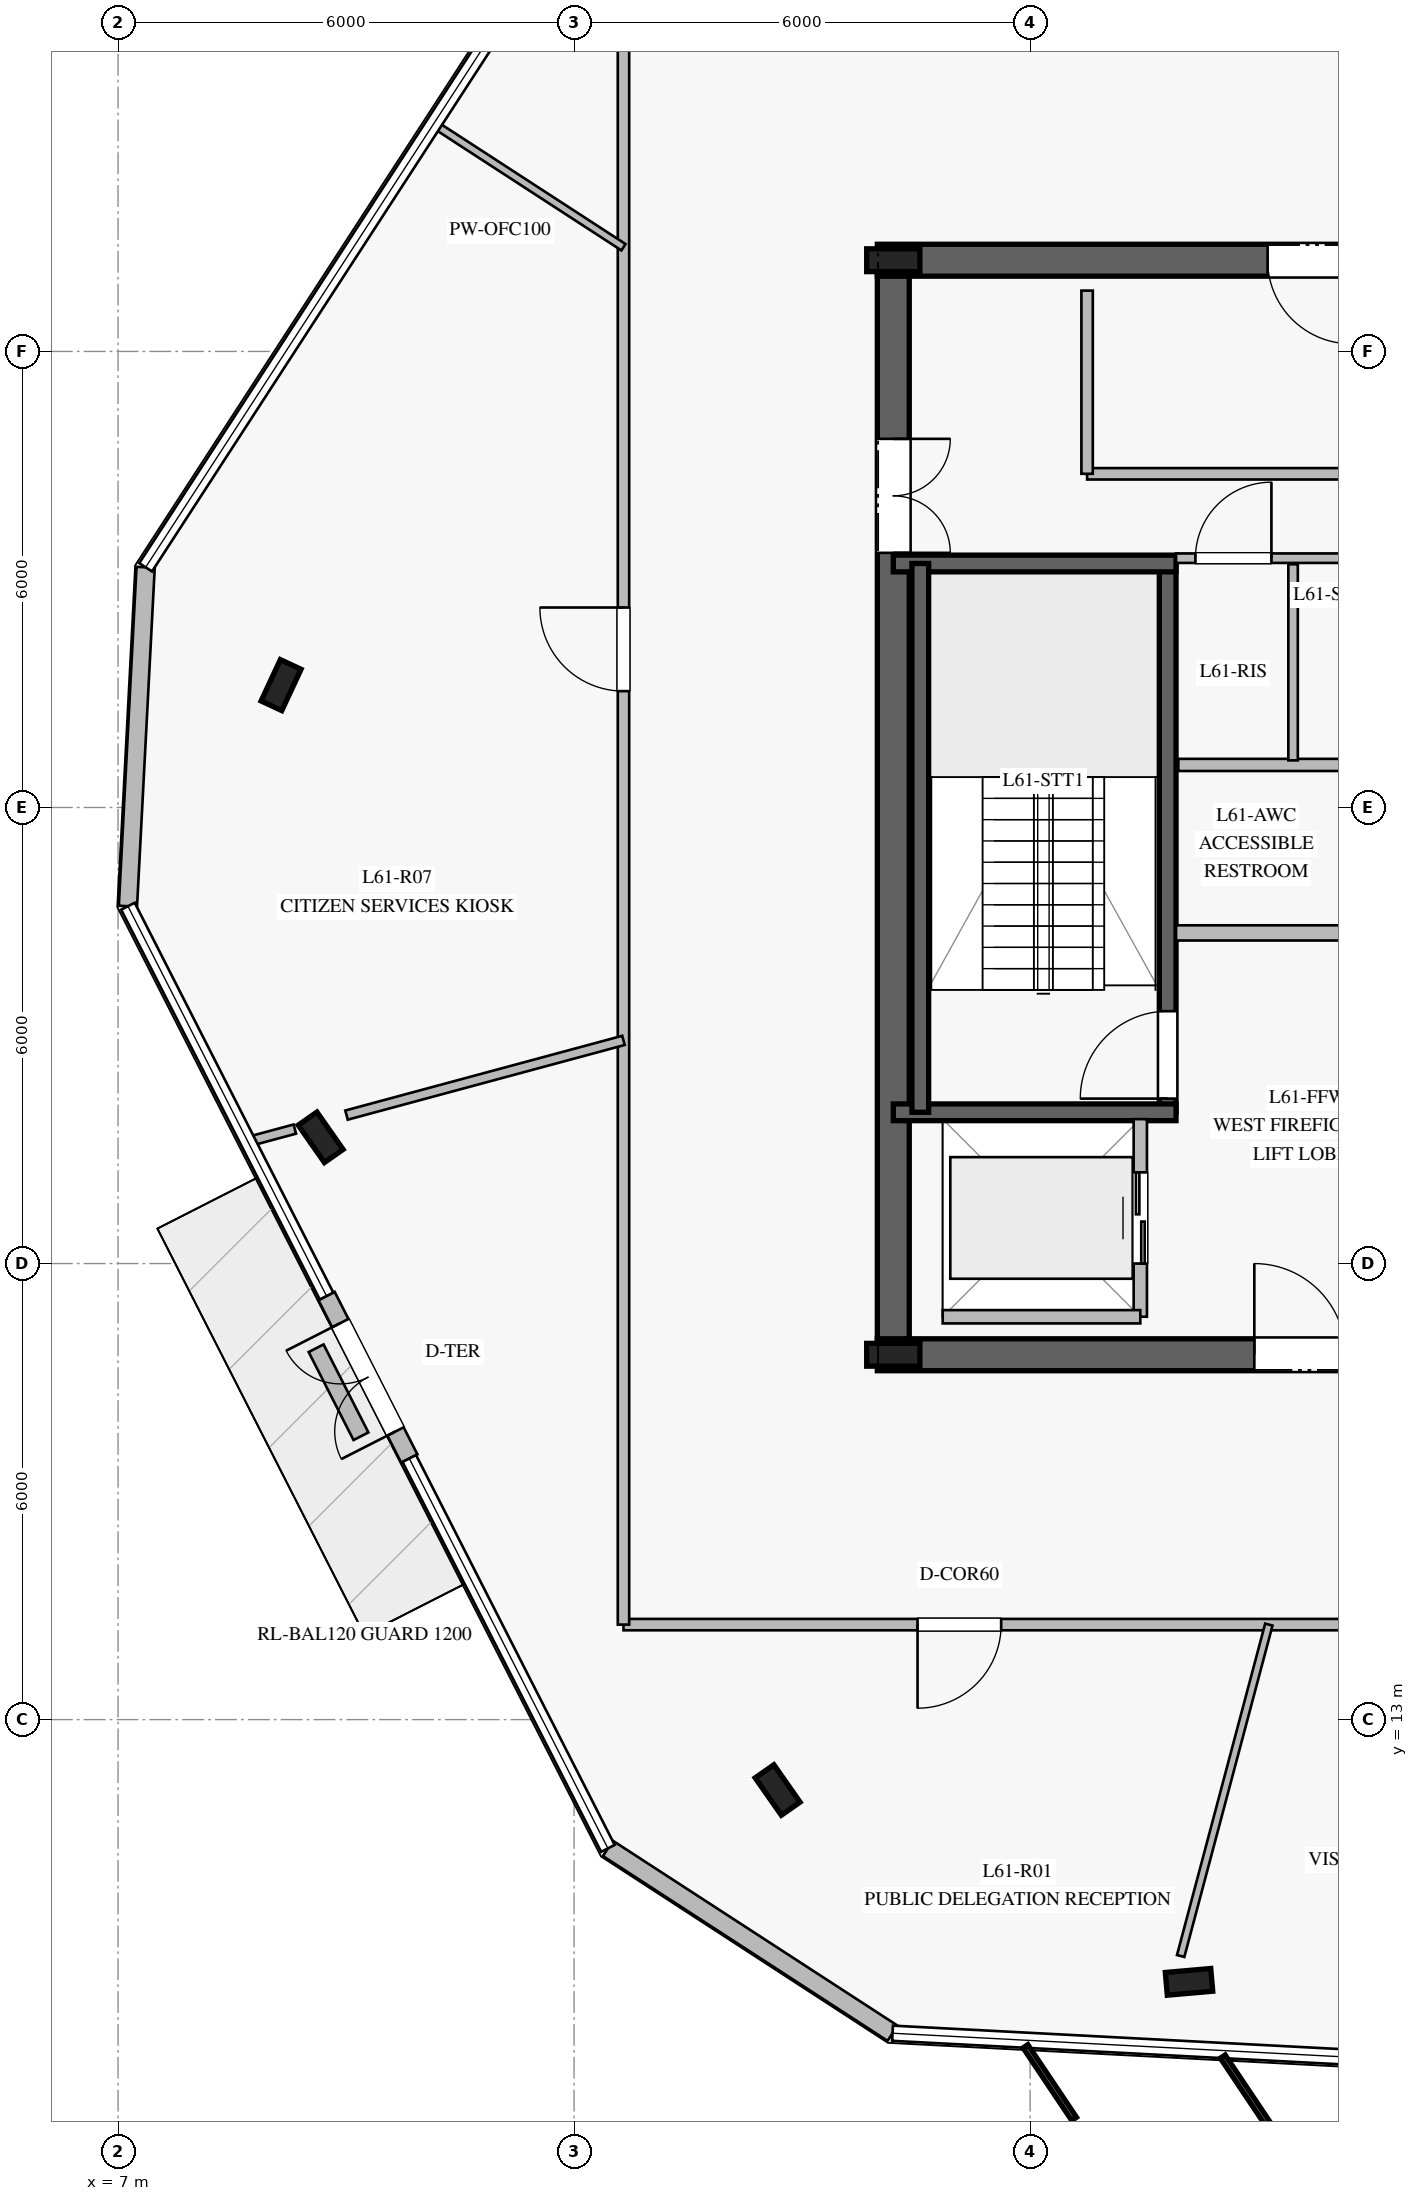
"""IFC4 building model, lengths in metres.
Left out: names, types, materials, properties, quantities, classifications, styles, units other than length and angle.
Written with IfcOpenShell. Run it as: python <this file> out.ifc"""

import sys

from ifc_helpers import new_model, si_unit, direction, frame, frame_2d, origin, origin_2d, place, context, subcontext, project, spatial, rectangle, i_section, extrude, element, fill, save


model = new_model("IFC4")
c1 = context("Model", 3, precision=1e-05, world=origin(), true_north=direction((0.0, 1.0)))
c2 = subcontext(c1, "Body", "Model", "MODEL_VIEW")
j1 = project(units=[si_unit("LENGTHUNIT", "METRE"), si_unit("PLANEANGLEUNIT", "RADIAN")], contexts=[c1])
p1 = place(None, origin())
s1 = spatial("IfcSite", under=j1, at=p1, CompositionType="ELEMENT")
p2 = place(p1, origin())
s2 = spatial("IfcBuilding", under=s1, at=p2, CompositionType="ELEMENT")
p3 = place(p2, frame((0.0, 0.0, 254.2)))
s3 = spatial("IfcBuildingStorey", under=s2, at=p3, CompositionType="ELEMENT", Elevation=254.2)
p4 = place(p3, frame((16.99, 17.8, 0.0), z_axis=(0.0, 0.0, 1.0), x_axis=(1.0, 0.0, 0.0)))
e1 = element("IfcWall", 1, at=p4, inside=s3, PredefinedType="SHEAR", context=c2, shape_type="SweptSolid", body=[
    extrude(rectangle(XDim=16.02, YDim=0.42, at=frame_2d((8.01, 0.0))), origin(), (0.0, 0.0, 1.0), 3.78),
])
p5 = place(p4, frame((4.96, 0.0, 0.0)))
e2 = element("IfcOpeningElement", 2, at=p5, cuts=e1, PredefinedType="OPENING", context=c2, shape_type="SweptSolid", body=[
    extrude(rectangle(XDim=1.2, YDim=2.25, at=frame_2d((0.6, 1.125))), frame((0.0, 0.22, 0.0), z_axis=(0.0, -1.0, 0.0), x_axis=(1.0, 0.0, 0.0)), (0.0, 0.0, 1.0), 0.44),
])
p6 = place(p4, frame((10.86, 0.0, 0.0)))
e3 = element("IfcOpeningElement", 3, at=p6, cuts=e1, PredefinedType="OPENING", context=c2, shape_type="SweptSolid", body=[
    extrude(rectangle(XDim=1.1, YDim=2.2, at=frame_2d((0.55, 1.1))), frame((0.0, 0.22, 0.0), z_axis=(0.0, -1.0, 0.0), x_axis=(1.0, 0.0, 0.0)), (0.0, 0.0, 1.0), 0.44),
])
p7 = place(p3, frame((33.01, 32.2, 0.0), z_axis=(0.0, 0.0, 1.0), x_axis=(-1.0, 0.0, 0.0)))
e4 = element("IfcWall", 4, at=p7, inside=s3, PredefinedType="SHEAR", context=c2, shape_type="SweptSolid", body=[
    extrude(rectangle(XDim=16.02, YDim=0.42, at=frame_2d((8.01, 0.0))), origin(), (0.0, 0.0, 1.0), 3.78),
])
p8 = place(p7, frame((4.96, 0.0, 0.0)))
e5 = element("IfcOpeningElement", 5, at=p8, cuts=e4, PredefinedType="OPENING", context=c2, shape_type="SweptSolid", body=[
    extrude(rectangle(XDim=1.2, YDim=2.25, at=frame_2d((0.6, 1.125))), frame((0.0, 0.22, 0.0), z_axis=(0.0, -1.0, 0.0), x_axis=(1.0, 0.0, 0.0)), (0.0, 0.0, 1.0), 0.44),
])
p9 = place(p7, frame((9.785, 0.0, 0.0)))
e6 = element("IfcOpeningElement", 6, at=p9, cuts=e4, PredefinedType="OPENING", context=c2, shape_type="SweptSolid", body=[
    extrude(rectangle(XDim=1.1, YDim=2.2, at=frame_2d((0.55, 1.1))), frame((0.0, 0.22, 0.0), z_axis=(0.0, -1.0, 0.0), x_axis=(1.0, 0.0, 0.0)), (0.0, 0.0, 1.0), 0.44),
])
p10 = place(p3, frame((17.2, 31.99, 0.0), z_axis=(0.0, 0.0, 1.0), x_axis=(0.0, -1.0, 0.0)))
e7 = element("IfcWall", 7, at=p10, inside=s3, PredefinedType="SHEAR", context=c2, shape_type="SweptSolid", body=[
    extrude(rectangle(XDim=13.98, YDim=0.42, at=frame_2d((6.99, 0.0))), origin(), (0.0, 0.0, 1.0), 3.78),
])
p11 = place(p10, frame((2.14, 0.0, 0.0)))
e8 = element("IfcOpeningElement", 8, at=p11, cuts=e7, PredefinedType="OPENING", context=c2, shape_type="SweptSolid", body=[
    extrude(rectangle(XDim=1.5, YDim=2.2, at=frame_2d((0.75, 1.1))), frame((0.0, 0.22, 0.0), z_axis=(0.0, -1.0, 0.0), x_axis=(1.0, 0.0, 0.0)), (0.0, 0.0, 1.0), 0.44),
])
for number, where, z_axis, x_axis in (
    (9, (17.2, 17.8, 0.0), (0.0, 0.0, 1.0), (1.0, 0.0, 0.0)),
    (10, (17.2, 32.2, 0.0), (0.0, 0.0, 1.0), (1.0, 0.0, 0.0)),
):
    element("IfcColumn", number, at=place(p3, frame(where, z_axis=z_axis, x_axis=x_axis)), inside=s3, PredefinedType="COLUMN", context=c2, shape_type="SweptSolid", body=[
        extrude(i_section(OverallWidth=0.3, OverallDepth=0.7, WebThickness=0.017, FlangeThickness=0.032, at=origin_2d()), origin(), (0.0, 0.0, 1.0), 4.0),
    ])
p12 = place(p3, frame((20.81, 20.99, 0.0), z_axis=(0.0, 0.0, 1.0), x_axis=(0.0, 1.0, 0.0)))
e11 = element("IfcWall", 11, at=p12, inside=s3, PredefinedType="SOLIDWALL", context=c2, shape_type="SweptSolid", body=[
    extrude(rectangle(XDim=7.22, YDim=0.22, at=frame_2d((3.61, 0.0))), origin(), (0.0, 0.0, 1.0), 3.78),
])
p13 = place(p12, frame((0.18, 0.0, 0.0)))
e12 = element("IfcOpeningElement", 12, at=p13, cuts=e11, PredefinedType="OPENING", context=c2, shape_type="SweptSolid", body=[
    extrude(rectangle(XDim=1.15, YDim=2.2, at=frame_2d((0.575, 1.1))), frame((0.0, 0.12, 0.0), z_axis=(0.0, -1.0, 0.0), x_axis=(1.0, 0.0, 0.0)), (0.0, 0.0, 1.0), 0.24),
])
for number, where, z_axis, x_axis in (
    (13, (17.2, 20.99, 0.0), (0.0, 0.0, 1.0), (1.0, 0.0, 0.0)),
    (14, (17.2, 28.21, 0.0), (0.0, 0.0, 1.0), (1.0, 0.0, 0.0)),
):
    element("IfcWall", number, at=place(p3, frame(where, z_axis=z_axis, x_axis=x_axis)), inside=s3, PredefinedType="SOLIDWALL", context=c2, shape_type="SweptSolid", body=[
        extrude(rectangle(XDim=3.72, YDim=0.22, at=frame_2d((1.86, 0.0))), origin(), (0.0, 0.0, 1.0), 3.78),
    ])
p14 = place(p3, frame((17.555, 28.21, 0.0), z_axis=(0.0, 0.0, 1.0), x_axis=(0.0, -1.0, 0.0)))
e15 = element("IfcWall", 15, at=p14, inside=s3, PredefinedType="SOLIDWALL", context=c2, shape_type="SweptSolid", body=[
    extrude(rectangle(XDim=7.22, YDim=0.22, at=frame_2d((3.61, 0.0))), origin(), (0.0, 0.0, 1.0), 3.78),
])
for number, where, z_axis, x_axis in (
    (16, (9.145, 26.61, 0.0), (0.0, 0.0, 1.0), (0.423, 0.906, 0.0)),
    (17, (9.666, 20.661, 0.0), (0.0, 0.0, 1.0), (-0.574, 0.819, 0.0)),
    (18, (15.678, 12.074, 0.0), (0.0, 0.0, 1.0), (-0.574, 0.819, 0.0)),
    (19, (21.091, 9.55, 0.0), (0.0, 0.0, 1.0), (0.996, 0.087, 0.0)),
):
    element("IfcColumn", number, at=place(p3, frame(where, z_axis=z_axis, x_axis=x_axis)), inside=s3, PredefinedType="COLUMN", context=c2, shape_type="SweptSolid", body=[
        extrude(i_section(OverallWidth=0.3, OverallDepth=0.6, WebThickness=0.015, FlangeThickness=0.03, at=origin_2d()), origin(), (0.0, 0.0, 1.0), 4.0),
    ])
p15 = place(p3, frame((7.363, 28.16, 0.0), z_axis=(0.0, 0.0, 1.0), x_axis=(-0.052217320226, -0.998635745139, 0.0)))
e20 = element("IfcWall", 20, at=p15, inside=s3, PredefinedType="STANDARD", context=c2, shape_type="SweptSolid", body=[
    extrude(rectangle(XDim=4.465, YDim=0.24, at=frame_2d((2.232, 0.0))), origin(), (0.0, 0.0, 1.0), 3.78),
])
p16 = place(p3, frame((9.743, 18.573, 0.0), z_axis=(0.0, 0.0, 1.0), x_axis=(0.453916635775, -0.891044155902, 0.0)))
e21 = element("IfcWall", 21, at=p16, inside=s3, PredefinedType="STANDARD", context=c2, shape_type="SweptSolid", body=[
    extrude(rectangle(XDim=2.399, YDim=0.24, at=frame_2d((1.2, 0.0))), origin(), (0.0, 0.0, 1.0), 3.78),
])
p17 = place(p16, frame((0.4, 0.0, 0.0)))
e22 = element("IfcOpeningElement", 22, at=p17, cuts=e21, PredefinedType="OPENING", context=c2, shape_type="SweptSolid", body=[
    extrude(rectangle(XDim=1.6, YDim=2.25, at=frame_2d((0.8, 1.125))), frame((0.0, 0.13, 0.0), z_axis=(0.0, -1.0, 0.0), x_axis=(1.0, 0.0, 0.0)), (0.0, 0.0, 1.0), 0.26),
])
p18 = place(p3, frame((13.445, 11.306, 0.0), z_axis=(0.0, 0.0, 1.0), x_axis=(0.838677137994, -0.544628917893, 0.0)))
e23 = element("IfcWall", 23, at=p18, inside=s3, PredefinedType="STANDARD", context=c2, shape_type="SweptSolid", body=[
    extrude(rectangle(XDim=4.465, YDim=0.24, at=frame_2d((2.233, 0.0))), origin(), (0.0, 0.0, 1.0), 3.78),
])
p19 = place(p3, frame((9.606, 17.886, 0.0), z_axis=(0.0, 0.0, 1.0), x_axis=(0.454038340343, -0.890982146565, 0.0)))
e24 = element("IfcWall", 24, at=p19, inside=s3, PredefinedType="USERDEFINED", context=c2, shape_type="SweptSolid", body=[
    extrude(rectangle(XDim=1.3, YDim=0.22, at=frame_2d((0.65, 0.0))), origin(), (0.0, 0.0, 1.0), 0.4),
])
p20 = place(p3, frame((20.92, 23.35, 0.0), z_axis=(0.0, 0.0, 1.0), x_axis=(1.0, 0.0, 0.0)))
e25 = element("IfcWall", 25, at=p20, inside=s3, PredefinedType="PARTITIONING", context=c2, shape_type="SweptSolid", body=[
    extrude(rectangle(XDim=3.38, YDim=0.2, at=frame_2d((1.69, 0.0))), origin(), (0.0, 0.0, 1.0), 3.78),
])
p21 = place(p3, frame((20.92, 28.28, 0.0), z_axis=(0.0, 0.0, 1.0), x_axis=(1.0, 0.0, 0.0)))
e26 = element("IfcWall", 26, at=p21, inside=s3, PredefinedType="PARTITIONING", context=c2, shape_type="SweptSolid", body=[
    extrude(rectangle(XDim=3.405, YDim=0.125, at=frame_2d((1.703, 0.0))), origin(), (0.0, 0.0, 1.0), 3.78),
])
p22 = place(p21, frame((0.255, 0.0, 0.0)))
e27 = element("IfcOpeningElement", 27, at=p22, cuts=e26, PredefinedType="OPENING", context=c2, shape_type="SweptSolid", body=[
    extrude(rectangle(XDim=1.0, YDim=2.15, at=frame_2d((0.5, 1.075))), frame((0.0, 0.073, 0.0), z_axis=(0.0, -1.0, 0.0), x_axis=(1.0, 0.0, 0.0)), (0.0, 0.0, 1.0), 0.145),
])
p23 = place(p3, frame((20.95, 25.56, 0.0), z_axis=(0.0, 0.0, 1.0), x_axis=(1.0, 0.0, 0.0)))
e28 = element("IfcWall", 28, at=p23, inside=s3, PredefinedType="PLUMBINGWALL", context=c2, shape_type="SweptSolid", body=[
    extrude(rectangle(XDim=3.3, YDim=0.16, at=frame_2d((1.65, 0.0))), origin(), (0.0, 0.0, 1.0), 3.78),
])
p24 = place(p3, frame((22.46, 25.62, 0.0), z_axis=(0.0, 0.0, 1.0), x_axis=(0.0, 1.0, 0.0)))
e29 = element("IfcWall", 29, at=p24, inside=s3, PredefinedType="PARTITIONING", context=c2, shape_type="SweptSolid", body=[
    extrude(rectangle(XDim=2.58, YDim=0.125, at=frame_2d((1.29, 0.0))), origin(), (0.0, 0.0, 1.0), 3.78),
])
p25 = place(p3, frame((19.75, 29.39, 0.0), z_axis=(0.0, 0.0, 1.0), x_axis=(1.0, 0.0, 0.0)))
e30 = element("IfcWall", 30, at=p25, inside=s3, PredefinedType="PARTITIONING", context=c2, shape_type="SweptSolid", body=[
    extrude(rectangle(XDim=5.9, YDim=0.15, at=frame_2d((2.95, 0.0))), origin(), (0.0, 0.0, 1.0), 3.78),
])
p26 = place(p3, frame((19.75, 29.39, 0.0), z_axis=(0.0, 0.0, 1.0), x_axis=(0.0, 1.0, 0.0)))
e31 = element("IfcWall", 31, at=p26, inside=s3, PredefinedType="PARTITIONING", context=c2, shape_type="SweptSolid", body=[
    extrude(rectangle(XDim=2.41, YDim=0.15, at=frame_2d((1.205, 0.0))), origin(), (0.0, 0.0, 1.0), 3.78),
])
p27 = place(p3, frame((20.45, 18.3, 0.0), z_axis=(0.0, 0.0, 1.0), x_axis=(0.0, 1.0, 0.0)))
e32 = element("IfcWall", 32, at=p27, inside=s3, PredefinedType="PARTITIONING", context=c2, shape_type="SweptSolid", body=[
    extrude(rectangle(XDim=2.6, YDim=0.175, at=frame_2d((1.3, 0.0))), origin(), (0.0, 0.0, 1.0), 3.78),
])
p28 = place(p27, frame((0.7, 0.0, 0.0)))
e33 = element("IfcOpeningElement", 33, at=p28, cuts=e32, PredefinedType="OPENING", context=c2, shape_type="SweptSolid", body=[
    extrude(rectangle(XDim=1.2, YDim=2.2, at=frame_2d((0.6, 1.1))), frame((0.0, 0.098, 0.0), z_axis=(0.0, -1.0, 0.0), x_axis=(1.0, 0.0, 0.0)), (0.0, 0.0, 1.0), 0.195),
])
p29 = place(p3, frame((17.85, 18.3, 0.0), z_axis=(0.0, 0.0, 1.0), x_axis=(1.0, 0.0, 0.0)))
e34 = element("IfcWall", 34, at=p29, inside=s3, PredefinedType="PARTITIONING", context=c2, shape_type="SweptSolid", body=[
    extrude(rectangle(XDim=2.6, YDim=0.175, at=frame_2d((1.3, 0.0))), origin(), (0.0, 0.0, 1.0), 3.78),
])
p30 = place(p3, frame((36.35, 14.25, 0.0), z_axis=(0.0, 0.0, 1.0), x_axis=(-1.0, 0.0, 0.0)))
e35 = element("IfcWall", 35, at=p30, inside=s3, PredefinedType="PARTITIONING", context=c2, shape_type="SweptSolid", body=[
    extrude(rectangle(XDim=22.7, YDim=0.15, at=frame_2d((11.35, 0.0))), origin(), (0.0, 0.0, 1.0), 3.28),
])
p31 = place(p30, frame((17.731, 0.0, 0.0)))
e36 = element("IfcOpeningElement", 36, at=p31, cuts=e35, PredefinedType="OPENING", context=c2, shape_type="SweptSolid", body=[
    extrude(rectangle(XDim=1.1, YDim=2.2, at=frame_2d((0.55, 1.1))), frame((0.0, 0.085, 0.0), z_axis=(0.0, -1.0, 0.0), x_axis=(1.0, 0.0, 0.0)), (0.0, 0.0, 1.0), 0.17),
])
p32 = place(p30, frame((8.654, 0.0, 0.0)))
e37 = element("IfcOpeningElement", 37, at=p32, cuts=e35, PredefinedType="OPENING", context=c2, shape_type="SweptSolid", body=[
    extrude(rectangle(XDim=1.1, YDim=2.2, at=frame_2d((0.55, 1.1))), frame((0.0, 0.085, 0.0), z_axis=(0.0, -1.0, 0.0), x_axis=(1.0, 0.0, 0.0)), (0.0, 0.0, 1.0), 0.17),
])
p33 = place(p3, frame((13.65, 14.25, 0.0), z_axis=(0.0, 0.0, 1.0), x_axis=(0.0, 1.0, 0.0)))
e38 = element("IfcWall", 38, at=p33, inside=s3, PredefinedType="PARTITIONING", context=c2, shape_type="SweptSolid", body=[
    extrude(rectangle(XDim=21.5, YDim=0.15, at=frame_2d((10.75, 0.0))), origin(), (0.0, 0.0, 1.0), 2.4),
])
p34 = place(p33, frame((12.281, 0.0, 0.0)))
e39 = element("IfcOpeningElement", 39, at=p34, cuts=e38, PredefinedType="OPENING", context=c2, shape_type="SweptSolid", body=[
    extrude(rectangle(XDim=1.1, YDim=2.2, at=frame_2d((0.55, 1.1))), frame((0.0, 0.085, 0.0), z_axis=(0.0, -1.0, 0.0), x_axis=(1.0, 0.0, 0.0)), (0.0, 0.0, 1.0), 0.17),
])
p35 = place(p3, frame((13.65, 32.371, 0.0), z_axis=(0.0, 0.0, 1.0), x_axis=(-0.838620526754, 0.544716083943, 0.0)))
e40 = element("IfcWall", 40, at=p35, inside=s3, PredefinedType="MOVABLE", context=c2, shape_type="SweptSolid", body=[
    extrude(rectangle(XDim=2.963, YDim=0.1, at=frame_2d((1.481, 0.0))), origin(), (0.0, 0.0, 1.0), 2.43),
])
p36 = place(p3, frame((13.65, 21.936, 0.0), z_axis=(0.0, 0.0, 1.0), x_axis=(-0.965473835876, -0.260500042685, 0.0)))
e41 = element("IfcWall", 41, at=p36, inside=s3, PredefinedType="PARTITIONING", context=c2, shape_type="SweptSolid", body=[
    extrude(rectangle(XDim=3.774, YDim=0.125, at=frame_2d((1.887, 0.0))), origin(), (0.0, 0.0, 1.0), 3.42),
])
p37 = place(p3, frame((9.326, 20.769, 0.0), z_axis=(0.0, 0.0, 1.0), x_axis=(-0.965581711412, -0.260099901167, 0.0)))
e42 = element("IfcWall", 42, at=p37, inside=s3, PredefinedType="PARTITIONING", context=c2, shape_type="SweptSolid", body=[
    extrude(rectangle(XDim=0.623, YDim=0.125, at=frame_2d((0.312, 0.0))), origin(), (0.0, 0.0, 1.0), 3.78),
])
p38 = place(p3, frame((22.141, 14.25, 0.0), z_axis=(0.0, 0.0, 1.0), x_axis=(-0.257137215794, -0.966374902537, 0.0)))
e43 = element("IfcWall", 43, at=p38, inside=s3, PredefinedType="MOVABLE", context=c2, shape_type="SweptSolid", body=[
    extrude(rectangle(XDim=4.512, YDim=0.1, at=frame_2d((2.256, 0.0))), origin(), (0.0, 0.0, 1.0), 3.28),
])
p39 = place(p17, frame((1.6, 0.0, 0.0), z_axis=(0.0, 0.0, 1.0), x_axis=(-1.0, 0.0, 0.0)))
e44 = element("IfcDoor", 44, at=p39, inside=s3, OperationType="DOUBLE_DOOR_SINGLE_SWING", PredefinedType="DOOR", context=c2, shape_type="SweptSolid", body=[
    extrude(rectangle(XDim=1.6, YDim=2.25, at=frame_2d((0.8, 1.125))), frame((0.0, 0.025, 0.0), z_axis=(0.0, -1.0, 0.0), x_axis=(1.0, 0.0, 0.0)), (0.0, 0.0, 1.0), 0.05),
])
fill(e22, e44)
p40 = place(p13, origin())
e45 = element("IfcDoor", 45, at=p40, inside=s3, OperationType="SINGLE_SWING_LEFT", PredefinedType="DOOR", context=c2, shape_type="SweptSolid", body=[
    extrude(rectangle(XDim=1.15, YDim=2.2, at=frame_2d((0.575, 1.1))), frame((0.0, 0.025, 0.0), z_axis=(0.0, -1.0, 0.0), x_axis=(1.0, 0.0, 0.0)), (0.0, 0.0, 1.0), 0.05),
])
fill(e12, e45)
p41 = place(p5, origin())
e46 = element("IfcDoor", 46, at=p41, inside=s3, OperationType="SINGLE_SWING_LEFT", PredefinedType="DOOR", context=c2, shape_type="SweptSolid", body=[
    extrude(rectangle(XDim=1.2, YDim=2.25, at=frame_2d((0.6, 1.125))), frame((0.0, 0.025, 0.0), z_axis=(0.0, -1.0, 0.0), x_axis=(1.0, 0.0, 0.0)), (0.0, 0.0, 1.0), 0.05),
])
fill(e2, e46)
p42 = place(p11, origin())
e47 = element("IfcDoor", 47, at=p42, inside=s3, OperationType="DOUBLE_DOOR_SINGLE_SWING", PredefinedType="DOOR", context=c2, shape_type="SweptSolid", body=[
    extrude(rectangle(XDim=1.5, YDim=2.2, at=frame_2d((0.75, 1.1))), frame((0.0, 0.025, 0.0), z_axis=(0.0, -1.0, 0.0), x_axis=(1.0, 0.0, 0.0)), (0.0, 0.0, 1.0), 0.05),
])
fill(e8, e47)
p43 = place(p22, origin())
e48 = element("IfcDoor", 48, at=p43, inside=s3, OperationType="SINGLE_SWING_RIGHT", PredefinedType="DOOR", context=c2, shape_type="SweptSolid", body=[
    extrude(rectangle(XDim=1.0, YDim=2.15, at=frame_2d((0.5, 1.075))), frame((0.0, 0.025, 0.0), z_axis=(0.0, -1.0, 0.0), x_axis=(1.0, 0.0, 0.0)), (0.0, 0.0, 1.0), 0.05),
])
fill(e27, e48)
p44 = place(p9, origin())
e49 = element("IfcDoor", 49, at=p44, inside=s3, OperationType="SINGLE_SWING_LEFT", PredefinedType="DOOR", context=c2, shape_type="SweptSolid", body=[
    extrude(rectangle(XDim=1.1, YDim=2.2, at=frame_2d((0.55, 1.1))), frame((0.0, 0.025, 0.0), z_axis=(0.0, -1.0, 0.0), x_axis=(1.0, 0.0, 0.0)), (0.0, 0.0, 1.0), 0.05),
])
fill(e6, e49)
p45 = place(p28, origin())
e50 = element("IfcDoor", 50, at=p45, inside=s3, OperationType="DOUBLE_DOOR_SLIDING", PredefinedType="DOOR", context=c2, shape_type="SweptSolid", body=[
    extrude(rectangle(XDim=1.2, YDim=2.2, at=frame_2d((0.6, 1.1))), frame((0.0, 0.025, 0.0), z_axis=(0.0, -1.0, 0.0), x_axis=(1.0, 0.0, 0.0)), (0.0, 0.0, 1.0), 0.05),
])
fill(e33, e50)
p46 = place(p31, origin())
e51 = element("IfcDoor", 51, at=p46, inside=s3, OperationType="SINGLE_SWING_RIGHT", PredefinedType="DOOR", context=c2, shape_type="SweptSolid", body=[
    extrude(rectangle(XDim=1.1, YDim=2.2, at=frame_2d((0.55, 1.1))), frame((0.0, 0.025, 0.0), z_axis=(0.0, -1.0, 0.0), x_axis=(1.0, 0.0, 0.0)), (0.0, 0.0, 1.0), 0.05),
])
fill(e36, e51)
p47 = place(p34, origin())
e52 = element("IfcDoor", 52, at=p47, inside=s3, OperationType="SINGLE_SWING_RIGHT", PredefinedType="DOOR", context=c2, shape_type="SweptSolid", body=[
    extrude(rectangle(XDim=1.1, YDim=2.2, at=frame_2d((0.55, 1.1))), frame((0.0, 0.025, 0.0), z_axis=(0.0, -1.0, 0.0), x_axis=(1.0, 0.0, 0.0)), (0.0, 0.0, 1.0), 0.05),
])
fill(e39, e52)
save(model, sys.argv[1])
